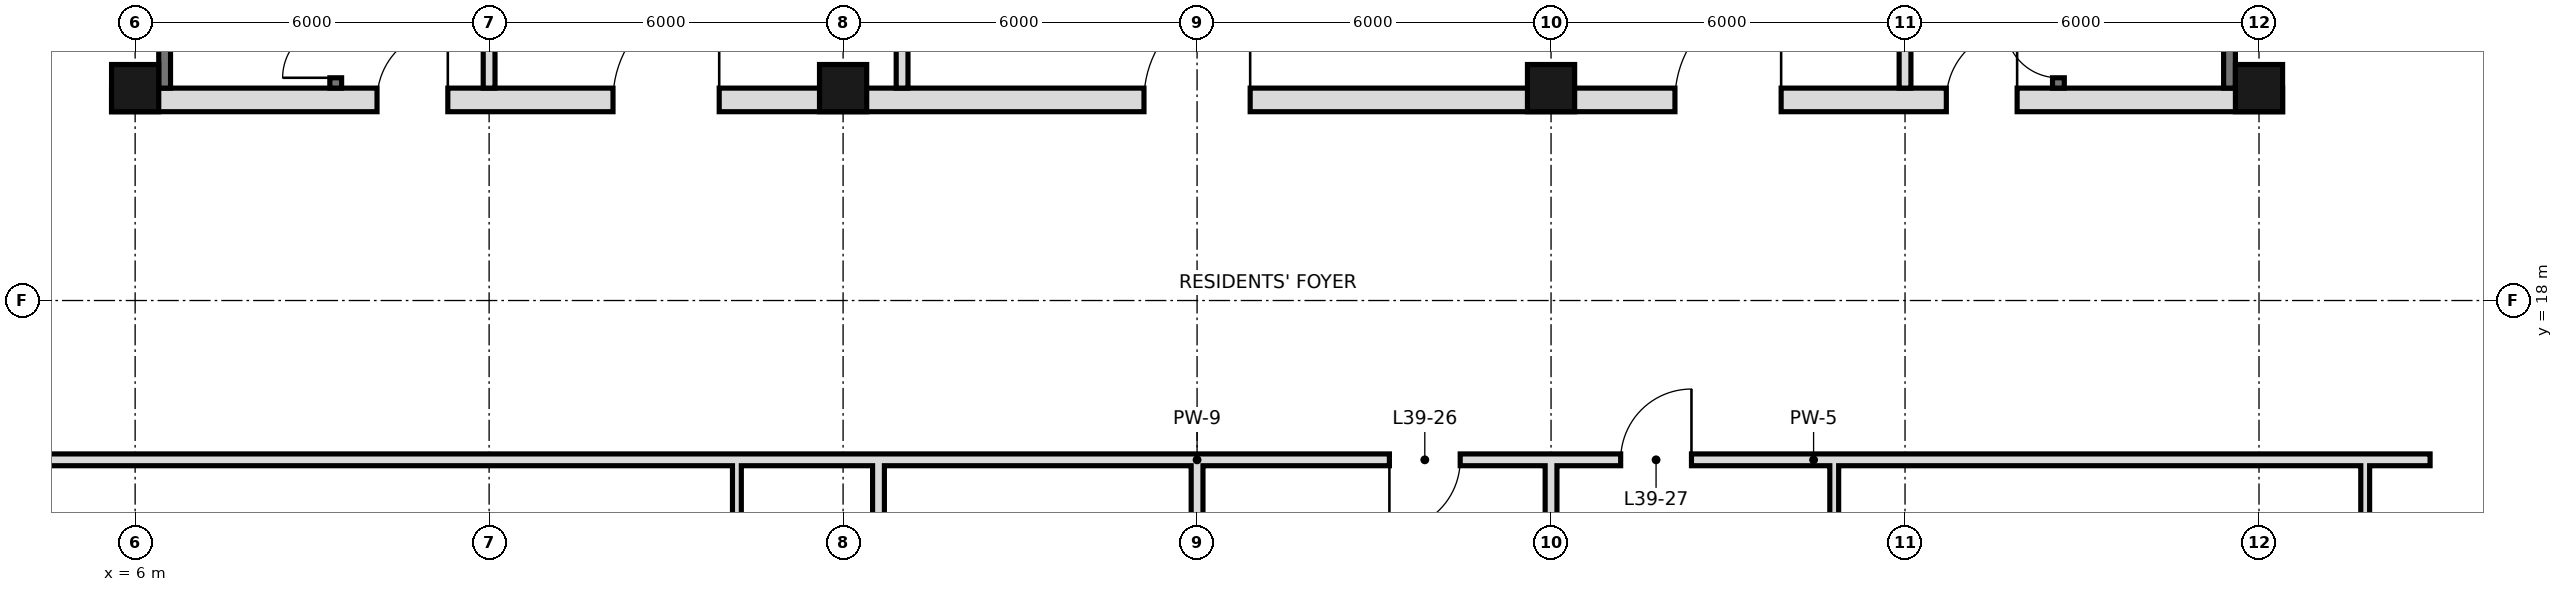
"""IFC4 building model, lengths in metres.
Left out: names, types, materials, properties, quantities, classifications, styles, units other than length and angle.
Written with IfcOpenShell. Run it as: python <this file> out.ifc"""

import sys

from ifc_helpers import new_model, si_unit, direction, frame, frame_2d, origin, origin_2d, place, context, subcontext, project, spatial, rectangle, hollow_rectangle, extrude, element, fill, save


model = new_model("IFC4")
c1 = context("Model", 3, precision=1e-05, world=origin(), true_north=direction((0.0, 1.0)))
c2 = subcontext(c1, "Body", "Model", "MODEL_VIEW")
j1 = project(units=[si_unit("LENGTHUNIT", "METRE"), si_unit("PLANEANGLEUNIT", "RADIAN")], contexts=[c1])
p1 = place(None, origin())
s1 = spatial("IfcSite", under=j1, at=p1, CompositionType="ELEMENT")
p2 = place(p1, origin())
s2 = spatial("IfcBuilding", under=s1, at=p2, CompositionType="ELEMENT")
p3 = place(p2, frame((0.0, 0.0, 170.8)))
s3 = spatial("IfcBuildingStorey", under=s2, at=p3, CompositionType="ELEMENT", Elevation=170.8)
for number, where, z_axis, x_axis in (
    (1, (6.0, 21.6, 0.0), (0.0, 0.0, 1.0), (1.0, 0.0, 0.0)),
    (2, (18.0, 21.6, 0.0), (0.0, 0.0, 1.0), (1.0, 0.0, 0.0)),
    (3, (30.0, 21.6, 0.0), (0.0, 0.0, 1.0), (1.0, 0.0, 0.0)),
    (4, (42.0, 21.6, 0.0), (0.0, 0.0, 1.0), (1.0, 0.0, 0.0)),
):
    element("IfcColumn", number, at=place(p3, frame(where, z_axis=z_axis, x_axis=x_axis)), inside=s3, PredefinedType="COLUMN", context=c2, shape_type="SweptSolid", body=[
        extrude(hollow_rectangle(XDim=0.8, YDim=0.8, WallThickness=0.045, at=origin_2d()), origin(), (0.0, 0.0, 1.0), 3.6),
    ])
p4 = place(p3, frame((16.2, 10.8, 0.0), z_axis=(0.0, 0.0, 1.0), x_axis=(0.0, 1.0, 0.0)))
e5 = element("IfcWall", 5, at=p4, inside=s3, PredefinedType="PARTITIONING", context=c2, shape_type="SweptSolid", body=[
    extrude(rectangle(XDim=4.5, YDim=0.15, at=frame_2d((2.25, 0.0))), origin(), (0.0, 0.0, 1.0), 3.42),
])
for number, where, z_axis, x_axis in (
    (6, (18.6, 10.8, 0.0), (0.0, 0.0, 1.0), (0.0, 1.0, 0.0)),
    (7, (24.0, 10.8, 0.0), (0.0, 0.0, 1.0), (0.0, 1.0, 0.0)),
):
    element("IfcWall", number, at=place(p3, frame(where, z_axis=z_axis, x_axis=x_axis)), inside=s3, PredefinedType="SOLIDWALL", context=c2, shape_type="SweptSolid", body=[
        extrude(rectangle(XDim=4.5, YDim=0.2, at=frame_2d((2.25, 0.0))), origin(), (0.0, 0.0, 1.0), 2.72),
    ])
p5 = place(p3, frame((30.0, -0.6, 0.0), z_axis=(0.0, 0.0, 1.0), x_axis=(0.0, 1.0, 0.0)))
e8 = element("IfcWall", 8, at=p5, inside=s3, PredefinedType="SOLIDWALL", context=c2, shape_type="SweptSolid", body=[
    extrude(rectangle(XDim=15.9, YDim=0.2, at=frame_2d((7.95, 0.0))), origin(), (0.0, 0.0, 1.0), 2.72),
])
for number, where, z_axis, x_axis in (
    (9, (34.8, 10.8, 0.0), (0.0, 0.0, 1.0), (0.0, 1.0, 0.0)),
    (10, (43.8, 10.8, 0.0), (0.0, 0.0, 1.0), (0.0, 1.0, 0.0)),
):
    element("IfcWall", number, at=place(p3, frame(where, z_axis=z_axis, x_axis=x_axis)), inside=s3, PredefinedType="PARTITIONING", context=c2, shape_type="SweptSolid", body=[
        extrude(rectangle(XDim=4.5, YDim=0.15, at=frame_2d((2.25, 0.0))), origin(), (0.0, 0.0, 1.0), 3.42),
    ])
p6 = place(p3, frame((3.1, 15.3, 0.0), z_axis=(0.0, 0.0, 1.0), x_axis=(1.0, 0.0, 0.0)))
e11 = element("IfcWall", 11, at=p6, inside=s3, PredefinedType="SOLIDWALL", context=c2, shape_type="SweptSolid", body=[
    extrude(rectangle(XDim=15.5, YDim=0.2, at=frame_2d((7.75, 0.0))), origin(), (0.0, 0.0, 1.0), 2.72),
])
p7 = place(p3, frame((24.0, 15.3, 0.0), z_axis=(0.0, 0.0, 1.0), x_axis=(1.0, 0.0, 0.0)))
e12 = element("IfcWall", 12, at=p7, inside=s3, PredefinedType="SOLIDWALL", context=c2, shape_type="SweptSolid", body=[
    extrude(rectangle(XDim=20.9, YDim=0.2, at=frame_2d((10.45, 0.0))), origin(), (0.0, 0.0, 1.0), 2.72),
])
p8 = place(p7, frame((3.26, 0.0, 0.0)))
e13 = element("IfcOpeningElement", 13, at=p8, cuts=e12, PredefinedType="OPENING", context=c2, shape_type="SweptSolid", body=[
    extrude(rectangle(XDim=1.2, YDim=2.4, at=frame_2d((0.6, 1.2))), frame((0.0, 0.11, 0.0), z_axis=(0.0, -1.0, 0.0), x_axis=(1.0, 0.0, 0.0)), (0.0, 0.0, 1.0), 0.22),
])
p9 = place(p7, frame((7.18, 0.0, 0.0)))
e14 = element("IfcOpeningElement", 14, at=p9, cuts=e12, PredefinedType="OPENING", context=c2, shape_type="SweptSolid", body=[
    extrude(rectangle(XDim=1.2, YDim=2.4, at=frame_2d((0.6, 1.2))), frame((0.0, 0.11, 0.0), z_axis=(0.0, -1.0, 0.0), x_axis=(1.0, 0.0, 0.0)), (0.0, 0.0, 1.0), 0.22),
])
p10 = place(p3, frame((18.6, 15.3, 0.0), z_axis=(0.0, 0.0, 1.0), x_axis=(1.0, 0.0, 0.0)))
e15 = element("IfcWall", 15, at=p10, inside=s3, PredefinedType="SOLIDWALL", context=c2, shape_type="SweptSolid", body=[
    extrude(rectangle(XDim=5.4, YDim=0.2, at=frame_2d((2.7, 0.0))), origin(), (0.0, 0.0, 1.0), 3.42),
])
for number, where, z_axis, x_axis in (
    (16, (6.5, 21.6, 0.0), (0.0, 0.0, 1.0), (0.0, 1.0, 0.0)),
    (17, (41.5, 21.6, 0.0), (0.0, 0.0, 1.0), (0.0, 1.0, 0.0)),
):
    element("IfcWall", number, at=place(p3, frame(where, z_axis=z_axis, x_axis=x_axis)), inside=s3, PredefinedType="SOLIDWALL", context=c2, shape_type="SweptSolid", body=[
        extrude(rectangle(XDim=23.5, YDim=0.2, at=frame_2d((11.75, 0.0))), origin(), (0.0, 0.0, 1.0), 3.42),
    ])
p11 = place(p3, frame((5.6, 21.4, 0.0), z_axis=(0.0, 0.0, 1.0), x_axis=(1.0, 0.0, 0.0)))
e18 = element("IfcWall", 18, at=p11, inside=s3, PredefinedType="SOLIDWALL", context=c2, shape_type="SweptSolid", body=[
    extrude(rectangle(XDim=36.8, YDim=0.4, at=frame_2d((18.4, 0.0))), origin(), (0.0, 0.0, 1.0), 3.42),
])
p12 = place(p11, frame((8.5, 0.0, 0.0)))
e19 = element("IfcOpeningElement", 19, at=p12, cuts=e18, PredefinedType="OPENING", context=c2, shape_type="SweptSolid", body=[
    extrude(rectangle(XDim=1.8, YDim=2.1, at=frame_2d((0.9, 1.05))), frame((0.0, 0.21, 0.0), z_axis=(0.0, -1.0, 0.0), x_axis=(1.0, 0.0, 0.0)), (0.0, 0.0, 1.0), 0.42),
])
p13 = place(p11, frame((17.5, 0.0, 0.0)))
e20 = element("IfcOpeningElement", 20, at=p13, cuts=e18, PredefinedType="OPENING", context=c2, shape_type="SweptSolid", body=[
    extrude(rectangle(XDim=1.8, YDim=2.1, at=frame_2d((0.9, 1.05))), frame((0.0, 0.21, 0.0), z_axis=(0.0, -1.0, 0.0), x_axis=(1.0, 0.0, 0.0)), (0.0, 0.0, 1.0), 0.42),
])
p14 = place(p11, frame((26.5, 0.0, 0.0)))
e21 = element("IfcOpeningElement", 21, at=p14, cuts=e18, PredefinedType="OPENING", context=c2, shape_type="SweptSolid", body=[
    extrude(rectangle(XDim=1.8, YDim=2.1, at=frame_2d((0.9, 1.05))), frame((0.0, 0.21, 0.0), z_axis=(0.0, -1.0, 0.0), x_axis=(1.0, 0.0, 0.0)), (0.0, 0.0, 1.0), 0.42),
])
p15 = place(p11, frame((4.5, 0.0, 0.0)))
e22 = element("IfcOpeningElement", 22, at=p15, cuts=e18, PredefinedType="OPENING", context=c2, shape_type="SweptSolid", body=[
    extrude(rectangle(XDim=1.2, YDim=2.1, at=frame_2d((0.6, 1.05))), frame((0.0, 0.21, 0.0), z_axis=(0.0, -1.0, 0.0), x_axis=(1.0, 0.0, 0.0)), (0.0, 0.0, 1.0), 0.42),
])
p16 = place(p11, frame((31.1, 0.0, 0.0)))
e23 = element("IfcOpeningElement", 23, at=p16, cuts=e18, PredefinedType="OPENING", context=c2, shape_type="SweptSolid", body=[
    extrude(rectangle(XDim=1.2, YDim=2.1, at=frame_2d((0.6, 1.05))), frame((0.0, 0.21, 0.0), z_axis=(0.0, -1.0, 0.0), x_axis=(1.0, 0.0, 0.0)), (0.0, 0.0, 1.0), 0.42),
])
p17 = place(p3, frame((19.0, 21.6, 0.0), z_axis=(0.0, 0.0, 1.0), x_axis=(0.0, 1.0, 0.0)))
e24 = element("IfcWall", 24, at=p17, inside=s3, PredefinedType="PARTITIONING", context=c2, shape_type="SweptSolid", body=[
    extrude(rectangle(XDim=6.0, YDim=0.2, at=frame_2d((3.0, 0.0))), origin(), (0.0, 0.0, 1.0), 3.42),
])
p18 = place(p17, frame((2.1, 0.0, 0.0)))
e25 = element("IfcOpeningElement", 25, at=p18, cuts=e24, PredefinedType="OPENING", context=c2, shape_type="SweptSolid", body=[
    extrude(rectangle(XDim=1.8, YDim=2.1, at=frame_2d((0.9, 1.05))), frame((0.0, 0.11, 0.0), z_axis=(0.0, -1.0, 0.0), x_axis=(1.0, 0.0, 0.0)), (0.0, 0.0, 1.0), 0.22),
])
for number, where, z_axis, x_axis in (
    (26, (12.0, 21.6, 0.0), (0.0, 0.0, 1.0), (0.0, 1.0, 0.0)),
    (27, (36.0, 21.6, 0.0), (0.0, 0.0, 1.0), (0.0, 1.0, 0.0)),
):
    element("IfcWall", number, at=place(p3, frame(where, z_axis=z_axis, x_axis=x_axis)), inside=s3, PredefinedType="PARTITIONING", context=c2, shape_type="SweptSolid", body=[
        extrude(rectangle(XDim=6.1, YDim=0.2, at=frame_2d((3.05, 0.0))), origin(), (0.0, 0.0, 1.0), 3.42),
    ])
p19 = place(p3, frame((38.6, 21.6, 0.0), z_axis=(0.0, 0.0, 1.0), x_axis=(0.0, 1.0, 0.0)))
e28 = element("IfcWall", 28, at=p19, inside=s3, PredefinedType="SOLIDWALL", context=c2, shape_type="SweptSolid", body=[
    extrude(rectangle(XDim=23.4, YDim=0.2, at=frame_2d((11.7, 0.0))), origin(), (0.0, 0.0, 1.0), 3.42),
])
p20 = place(p19, frame((7.0, 0.0, 0.0)))
e29 = element("IfcOpeningElement", 29, at=p20, cuts=e28, PredefinedType="OPENING", context=c2, shape_type="SweptSolid", body=[
    extrude(rectangle(XDim=1.1, YDim=2.1, at=frame_2d((0.55, 1.05))), frame((0.0, 0.11, 0.0), z_axis=(0.0, -1.0, 0.0), x_axis=(1.0, 0.0, 0.0)), (0.0, 0.0, 1.0), 0.22),
])
p21 = place(p19, frame((10.1, 0.0, 0.0)))
e30 = element("IfcOpeningElement", 30, at=p21, cuts=e28, PredefinedType="OPENING", context=c2, shape_type="SweptSolid", body=[
    extrude(rectangle(XDim=1.1, YDim=2.1, at=frame_2d((0.55, 1.05))), frame((0.0, 0.11, 0.0), z_axis=(0.0, -1.0, 0.0), x_axis=(1.0, 0.0, 0.0)), (0.0, 0.0, 1.0), 0.22),
])
p22 = place(p19, frame((13.2, 0.0, 0.0)))
e31 = element("IfcOpeningElement", 31, at=p22, cuts=e28, PredefinedType="OPENING", context=c2, shape_type="SweptSolid", body=[
    extrude(rectangle(XDim=1.1, YDim=2.1, at=frame_2d((0.55, 1.05))), frame((0.0, 0.11, 0.0), z_axis=(0.0, -1.0, 0.0), x_axis=(1.0, 0.0, 0.0)), (0.0, 0.0, 1.0), 0.22),
])
p23 = place(p19, frame((15.7, 0.0, 0.0)))
e32 = element("IfcOpeningElement", 32, at=p23, cuts=e28, PredefinedType="OPENING", context=c2, shape_type="SweptSolid", body=[
    extrude(rectangle(XDim=1.0, YDim=2.1, at=frame_2d((0.5, 1.05))), frame((0.0, 0.11, 0.0), z_axis=(0.0, -1.0, 0.0), x_axis=(1.0, 0.0, 0.0)), (0.0, 0.0, 1.0), 0.22),
])
p24 = place(p19, frame((0.175, 0.0, 0.0)))
e33 = element("IfcOpeningElement", 33, at=p24, cuts=e28, PredefinedType="OPENING", context=c2, shape_type="SweptSolid", body=[
    extrude(rectangle(XDim=0.9, YDim=2.1, at=frame_2d((0.45, 1.05))), frame((0.0, 0.11, 0.0), z_axis=(0.0, -1.0, 0.0), x_axis=(1.0, 0.0, 0.0)), (0.0, 0.0, 1.0), 0.22),
])
p25 = place(p3, frame((9.4, 21.6, 0.0), z_axis=(0.0, 0.0, 1.0), x_axis=(0.0, 1.0, 0.0)))
e34 = element("IfcWall", 34, at=p25, inside=s3, PredefinedType="SOLIDWALL", context=c2, shape_type="SweptSolid", body=[
    extrude(rectangle(XDim=23.4, YDim=0.2, at=frame_2d((11.7, 0.0))), origin(), (0.0, 0.0, 1.0), 3.42),
])
p26 = place(p25, frame((7.95, 0.0, 0.0)))
e35 = element("IfcOpeningElement", 35, at=p26, cuts=e34, PredefinedType="OPENING", context=c2, shape_type="SweptSolid", body=[
    extrude(rectangle(XDim=1.0, YDim=2.1, at=frame_2d((0.5, 1.05))), frame((0.0, 0.11, 0.0), z_axis=(0.0, -1.0, 0.0), x_axis=(1.0, 0.0, 0.0)), (0.0, 0.0, 1.0), 0.22),
])
p27 = place(p25, frame((12.6, 0.0, 0.0)))
e36 = element("IfcOpeningElement", 36, at=p27, cuts=e34, PredefinedType="OPENING", context=c2, shape_type="SweptSolid", body=[
    extrude(rectangle(XDim=1.0, YDim=2.1, at=frame_2d((0.5, 1.05))), frame((0.0, 0.11, 0.0), z_axis=(0.0, -1.0, 0.0), x_axis=(1.0, 0.0, 0.0)), (0.0, 0.0, 1.0), 0.22),
])
p28 = place(p25, frame((15.7, 0.0, 0.0)))
e37 = element("IfcOpeningElement", 37, at=p28, cuts=e34, PredefinedType="OPENING", context=c2, shape_type="SweptSolid", body=[
    extrude(rectangle(XDim=1.0, YDim=2.1, at=frame_2d((0.5, 1.05))), frame((0.0, 0.11, 0.0), z_axis=(0.0, -1.0, 0.0), x_axis=(1.0, 0.0, 0.0)), (0.0, 0.0, 1.0), 0.22),
])
p29 = place(p25, frame((0.175, 0.0, 0.0)))
e38 = element("IfcOpeningElement", 38, at=p29, cuts=e34, PredefinedType="OPENING", context=c2, shape_type="SweptSolid", body=[
    extrude(rectangle(XDim=0.9, YDim=2.1, at=frame_2d((0.45, 1.05))), frame((0.0, 0.11, 0.0), z_axis=(0.0, -1.0, 0.0), x_axis=(1.0, 0.0, 0.0)), (0.0, 0.0, 1.0), 0.22),
])
p30 = place(p8, frame((1.2, 0.0, 0.0), z_axis=(0.0, 0.0, 1.0), x_axis=(-1.0, 0.0, 0.0)))
e39 = element("IfcDoor", 39, at=p30, inside=s3, OperationType="SINGLE_SWING_RIGHT", PredefinedType="DOOR", context=c2, shape_type="SweptSolid", body=[
    extrude(rectangle(XDim=1.2, YDim=2.4, at=frame_2d((0.6, 1.2))), frame((0.0, 0.025, 0.0), z_axis=(0.0, -1.0, 0.0), x_axis=(1.0, 0.0, 0.0)), (0.0, 0.0, 1.0), 0.05),
])
fill(e13, e39)
p31 = place(p9, frame((1.2, 0.0, 0.0), z_axis=(0.0, 0.0, 1.0), x_axis=(-1.0, 0.0, 0.0)))
e40 = element("IfcDoor", 40, at=p31, inside=s3, OperationType="SINGLE_SWING_LEFT", PredefinedType="DOOR", context=c2, shape_type="SweptSolid", body=[
    extrude(rectangle(XDim=1.2, YDim=2.4, at=frame_2d((0.6, 1.2))), frame((0.0, 0.025, 0.0), z_axis=(0.0, -1.0, 0.0), x_axis=(1.0, 0.0, 0.0)), (0.0, 0.0, 1.0), 0.05),
])
fill(e14, e40)
p32 = place(p12, frame((1.8, 0.0, 0.0), z_axis=(0.0, 0.0, 1.0), x_axis=(-1.0, 0.0, 0.0)))
e41 = element("IfcDoor", 41, at=p32, inside=s3, OperationType="SINGLE_SWING_LEFT", PredefinedType="DOOR", context=c2, shape_type="SweptSolid", body=[
    extrude(rectangle(XDim=1.8, YDim=2.1, at=frame_2d((0.9, 1.05))), frame((0.0, 0.025, 0.0), z_axis=(0.0, -1.0, 0.0), x_axis=(1.0, 0.0, 0.0)), (0.0, 0.0, 1.0), 0.05),
])
fill(e19, e41)
p33 = place(p13, frame((1.8, 0.0, 0.0), z_axis=(0.0, 0.0, 1.0), x_axis=(-1.0, 0.0, 0.0)))
e42 = element("IfcDoor", 42, at=p33, inside=s3, OperationType="SINGLE_SWING_LEFT", PredefinedType="DOOR", context=c2, shape_type="SweptSolid", body=[
    extrude(rectangle(XDim=1.8, YDim=2.1, at=frame_2d((0.9, 1.05))), frame((0.0, 0.025, 0.0), z_axis=(0.0, -1.0, 0.0), x_axis=(1.0, 0.0, 0.0)), (0.0, 0.0, 1.0), 0.05),
])
fill(e20, e42)
p34 = place(p14, frame((1.8, 0.0, 0.0), z_axis=(0.0, 0.0, 1.0), x_axis=(-1.0, 0.0, 0.0)))
e43 = element("IfcDoor", 43, at=p34, inside=s3, OperationType="SINGLE_SWING_LEFT", PredefinedType="DOOR", context=c2, shape_type="SweptSolid", body=[
    extrude(rectangle(XDim=1.8, YDim=2.1, at=frame_2d((0.9, 1.05))), frame((0.0, 0.025, 0.0), z_axis=(0.0, -1.0, 0.0), x_axis=(1.0, 0.0, 0.0)), (0.0, 0.0, 1.0), 0.05),
])
fill(e21, e43)
p35 = place(p15, frame((1.2, 0.0, 0.0), z_axis=(0.0, 0.0, 1.0), x_axis=(-1.0, 0.0, 0.0)))
e44 = element("IfcDoor", 44, at=p35, inside=s3, OperationType="SINGLE_SWING_LEFT", PredefinedType="DOOR", context=c2, shape_type="SweptSolid", body=[
    extrude(rectangle(XDim=1.2, YDim=2.1, at=frame_2d((0.6, 1.05))), frame((0.0, 0.025, 0.0), z_axis=(0.0, -1.0, 0.0), x_axis=(1.0, 0.0, 0.0)), (0.0, 0.0, 1.0), 0.05),
])
fill(e22, e44)
p36 = place(p16, frame((1.2, 0.0, 0.0), z_axis=(0.0, 0.0, 1.0), x_axis=(-1.0, 0.0, 0.0)))
e45 = element("IfcDoor", 45, at=p36, inside=s3, OperationType="SINGLE_SWING_LEFT", PredefinedType="DOOR", context=c2, shape_type="SweptSolid", body=[
    extrude(rectangle(XDim=1.2, YDim=2.1, at=frame_2d((0.6, 1.05))), frame((0.0, 0.025, 0.0), z_axis=(0.0, -1.0, 0.0), x_axis=(1.0, 0.0, 0.0)), (0.0, 0.0, 1.0), 0.05),
])
fill(e23, e45)
p37 = place(p29, origin())
e46 = element("IfcDoor", 46, at=p37, inside=s3, OperationType="SINGLE_SWING_LEFT", PredefinedType="DOOR", context=c2, shape_type="SweptSolid", body=[
    extrude(rectangle(XDim=0.9, YDim=2.1, at=frame_2d((0.45, 1.05))), frame((0.0, 0.025, 0.0), z_axis=(0.0, -1.0, 0.0), x_axis=(1.0, 0.0, 0.0)), (0.0, 0.0, 1.0), 0.05),
])
fill(e38, e46)
p38 = place(p24, frame((0.9, 0.0, 0.0), z_axis=(0.0, 0.0, 1.0), x_axis=(-1.0, 0.0, 0.0)))
e47 = element("IfcDoor", 47, at=p38, inside=s3, OperationType="SINGLE_SWING_LEFT", PredefinedType="DOOR", context=c2, shape_type="SweptSolid", body=[
    extrude(rectangle(XDim=0.9, YDim=2.1, at=frame_2d((0.45, 1.05))), frame((0.0, 0.025, 0.0), z_axis=(0.0, -1.0, 0.0), x_axis=(1.0, 0.0, 0.0)), (0.0, 0.0, 1.0), 0.05),
])
fill(e33, e47)
save(model, sys.argv[1])
